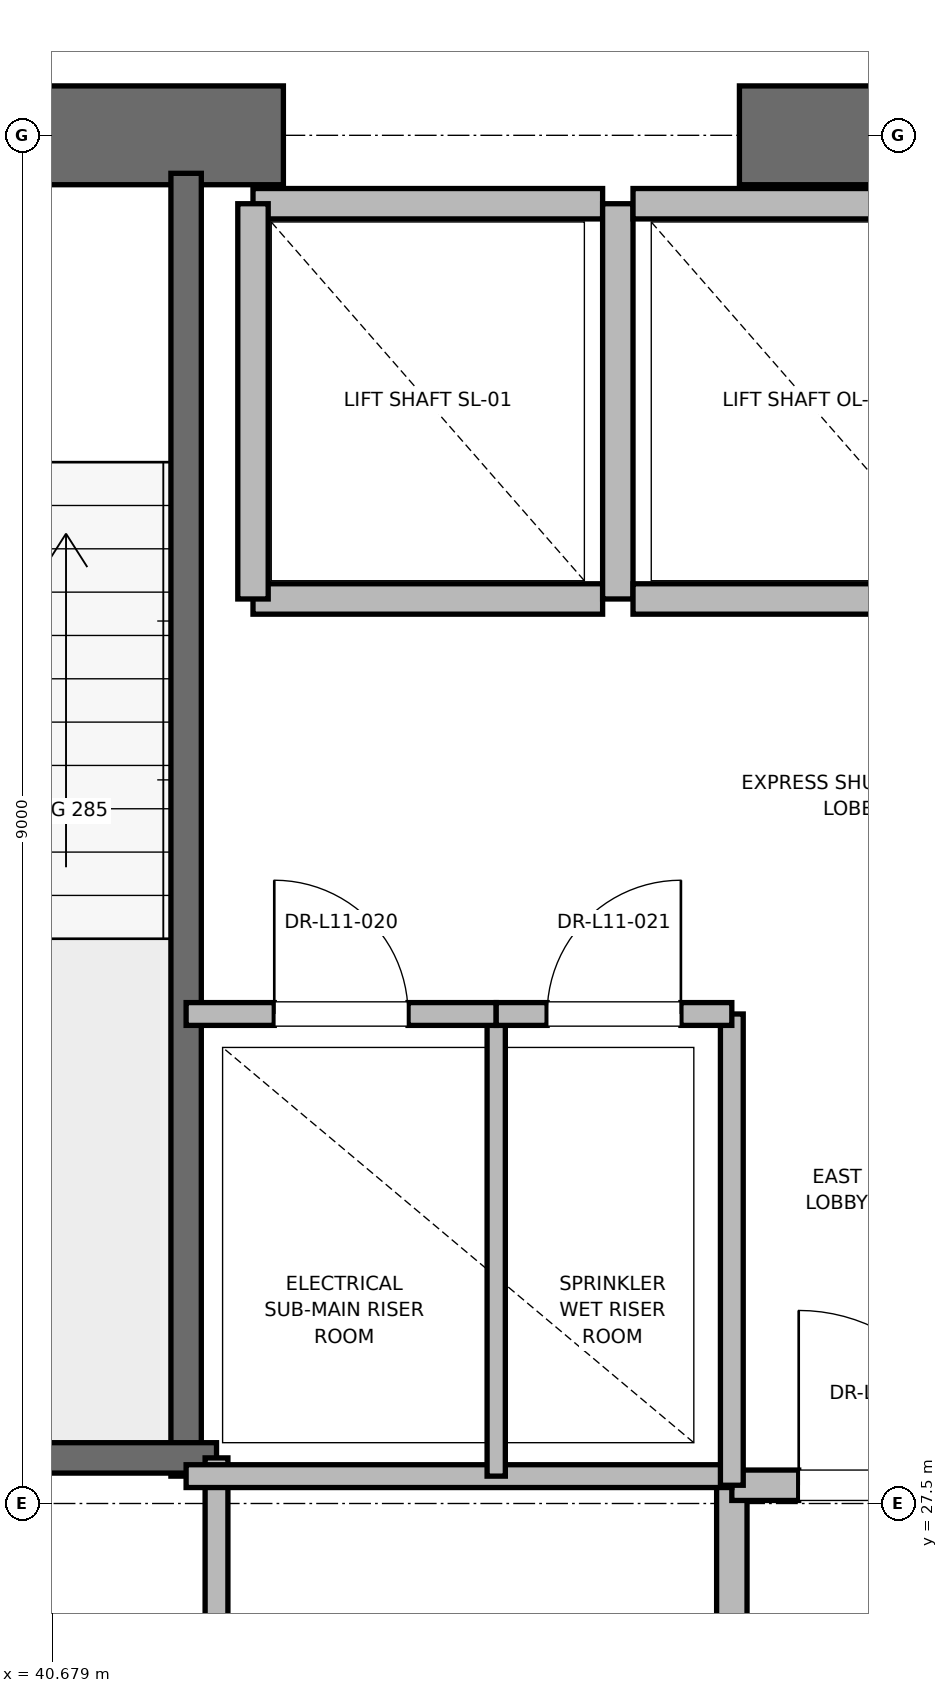
"""IFC4 building model, lengths in metres.
Left out: names, types, materials, properties, quantities, classifications, styles, units other than length and angle.
Written with IfcOpenShell. Run it as: python <this file> out.ifc"""

import sys

from ifc_helpers import new_model, si_unit, direction, frame, frame_2d, origin, place, context, subcontext, project, spatial, rectangle, extrude, element, fill, save


model = new_model("IFC4")
c1 = context("Model", 3, precision=1e-05, world=origin(), true_north=direction((0.0, 1.0)))
c2 = subcontext(c1, "Body", "Model", "MODEL_VIEW")
j1 = project(units=[si_unit("LENGTHUNIT", "METRE"), si_unit("PLANEANGLEUNIT", "RADIAN")], contexts=[c1])
p1 = place(None, origin())
s1 = spatial("IfcSite", under=j1, at=p1, CompositionType="ELEMENT")
p2 = place(p1, origin())
s2 = spatial("IfcBuilding", under=s1, at=p2, CompositionType="ELEMENT")
p3 = place(p2, frame((0.0, 0.0, 51.6)))
s3 = spatial("IfcBuildingStorey", under=s2, at=p3, CompositionType="ELEMENT", Elevation=51.6)
p4 = place(p3, frame((37.8, 36.5, 0.0), z_axis=(0.0, 0.0, 1.0), x_axis=(1.0, 0.0, 0.0)))
e1 = element("IfcWall", 1, at=p4, inside=s3, PredefinedType="SHEAR", context=c2, shape_type="SweptSolid", body=[
    extrude(rectangle(XDim=4.4, YDim=0.65, at=frame_2d((2.2, 0.0))), origin(), (0.0, 0.0, 1.0), 3.76),
])
p5 = place(p4, frame((1.65, 0.0, 0.0)))
e2 = element("IfcOpeningElement", 2, at=p5, cuts=e1, PredefinedType="OPENING", context=c2, shape_type="SweptSolid", body=[
    extrude(rectangle(XDim=1.1, YDim=2.15, at=frame_2d((0.55, 1.075))), frame((0.0, 0.325, 0.0), z_axis=(0.0, -1.0, 0.0), x_axis=(1.0, 0.0, 0.0)), (0.0, 0.0, 1.0), 0.65),
])
p6 = place(p3, frame((45.2, 36.5, 0.0), z_axis=(0.0, 0.0, 1.0), x_axis=(1.0, 0.0, 0.0)))
e3 = element("IfcWall", 3, at=p6, inside=s3, PredefinedType="SHEAR", context=c2, shape_type="SweptSolid", body=[
    extrude(rectangle(XDim=5.8, YDim=0.65, at=frame_2d((2.9, 0.0))), origin(), (0.0, 0.0, 1.0), 3.76),
])
p7 = place(p3, frame((41.56, 27.68, 0.0), z_axis=(0.0, 0.0, 1.0), x_axis=(0.0, 1.0, 0.0)))
e4 = element("IfcWall", 4, at=p7, inside=s3, PredefinedType="SOLIDWALL", context=c2, shape_type="SweptSolid", body=[
    extrude(rectangle(XDim=8.57, YDim=0.2, at=frame_2d((4.285, 0.0))), origin(), (0.0, 0.0, 1.0), 3.76),
])
p8 = place(p3, frame((38.44, 27.8, 0.0), z_axis=(0.0, 0.0, 1.0), x_axis=(1.0, 0.0, 0.0)))
e5 = element("IfcWall", 5, at=p8, inside=s3, PredefinedType="SOLIDWALL", context=c2, shape_type="SweptSolid", body=[
    extrude(rectangle(XDim=3.32, YDim=0.2, at=frame_2d((1.66, 0.0))), origin(), (0.0, 0.0, 1.0), 3.76),
])
p9 = place(p3, frame((45.15, 24.25, 0.0), z_axis=(0.0, 0.0, 1.0), x_axis=(0.0, 1.0, 0.0)))
e6 = element("IfcWall", 6, at=p9, inside=s3, PredefinedType="PARTITIONING", context=c2, shape_type="SweptSolid", body=[
    extrude(rectangle(XDim=3.37, YDim=0.2, at=frame_2d((1.685, 0.0))), origin(), (0.0, 0.0, 1.0), 3.76),
])
p10 = place(p3, frame((45.15, 27.62, 0.0), z_axis=(0.0, 0.0, 1.0), x_axis=(1.0, 0.0, 0.0)))
e7 = element("IfcWall", 7, at=p10, inside=s3, PredefinedType="PARTITIONING", context=c2, shape_type="SweptSolid", body=[
    extrude(rectangle(XDim=2.03, YDim=0.2, at=frame_2d((1.015, 0.0))), origin(), (0.0, 0.0, 1.0), 3.76),
])
p11 = place(p10, frame((0.44, 0.0, 0.0)))
e8 = element("IfcOpeningElement", 8, at=p11, cuts=e7, PredefinedType="OPENING", context=c2, shape_type="SweptSolid", body=[
    extrude(rectangle(XDim=1.15, YDim=2.2, at=frame_2d((0.575, 1.1))), frame((0.0, 0.1, 0.0), z_axis=(0.0, -1.0, 0.0), x_axis=(1.0, 0.0, 0.0)), (0.0, 0.0, 1.0), 0.2),
])
p12 = place(p3, frame((42.0, 33.45, 0.0), z_axis=(0.0, 0.0, 1.0), x_axis=(1.0, 0.0, 0.0)))
e9 = element("IfcWall", 9, at=p12, inside=s3, PredefinedType="SOLIDWALL", context=c2, shape_type="SweptSolid", body=[
    extrude(rectangle(XDim=2.3, YDim=0.2, at=frame_2d((1.15, 0.0))), origin(), (0.0, 0.0, 1.0), 3.76),
])
p13 = place(p3, frame((44.3, 36.05, 0.0), z_axis=(0.0, 0.0, 1.0), x_axis=(-1.0, 0.0, 0.0)))
e10 = element("IfcWall", 10, at=p13, inside=s3, PredefinedType="SOLIDWALL", context=c2, shape_type="SweptSolid", body=[
    extrude(rectangle(XDim=2.3, YDim=0.2, at=frame_2d((1.15, 0.0))), origin(), (0.0, 0.0, 1.0), 2.54),
])
for number, where, z_axis, x_axis in (
    (11, (42.0, 36.05, 0.0), (0.0, 0.0, 1.0), (0.0, -1.0, 0.0)),
    (12, (44.4, 33.45, 0.0), (0.0, 0.0, 1.0), (0.0, 1.0, 0.0)),
):
    element("IfcWall", number, at=place(p3, frame(where, z_axis=z_axis, x_axis=x_axis)), inside=s3, PredefinedType="SOLIDWALL", context=c2, shape_type="SweptSolid", body=[
        extrude(rectangle(XDim=2.6, YDim=0.2, at=frame_2d((1.3, 0.0))), origin(), (0.0, 0.0, 1.0), 2.54),
    ])
p14 = place(p3, frame((44.5, 33.45, 0.0), z_axis=(0.0, 0.0, 1.0), x_axis=(1.0, 0.0, 0.0)))
e13 = element("IfcWall", 13, at=p14, inside=s3, PredefinedType="SOLIDWALL", context=c2, shape_type="SweptSolid", body=[
    extrude(rectangle(XDim=2.3, YDim=0.2, at=frame_2d((1.15, 0.0))), origin(), (0.0, 0.0, 1.0), 3.76),
])
p15 = place(p3, frame((46.8, 36.05, 0.0), z_axis=(0.0, 0.0, 1.0), x_axis=(-1.0, 0.0, 0.0)))
e14 = element("IfcWall", 14, at=p15, inside=s3, PredefinedType="SOLIDWALL", context=c2, shape_type="SweptSolid", body=[
    extrude(rectangle(XDim=2.3, YDim=0.2, at=frame_2d((1.15, 0.0))), origin(), (0.0, 0.0, 1.0), 2.54),
])
p16 = place(p3, frame((41.76, 23.8, 0.0), z_axis=(0.0, 0.0, 1.0), x_axis=(0.0, 1.0, 0.0)))
e15 = element("IfcWall", 15, at=p16, inside=s3, PredefinedType="PARTITIONING", context=c2, shape_type="SweptSolid", body=[
    extrude(rectangle(XDim=4.0, YDim=0.15, at=frame_2d((2.0, 0.0))), origin(), (0.0, 0.0, 1.0), 2.85),
])
p17 = place(p3, frame((41.56, 27.68, 0.0), z_axis=(0.0, 0.0, 1.0), x_axis=(1.0, 0.0, 0.0)))
e16 = element("IfcWall", 16, at=p17, inside=s3, PredefinedType="PARTITIONING", context=c2, shape_type="SweptSolid", body=[
    extrude(rectangle(XDim=3.59, YDim=0.15, at=frame_2d((1.795, 0.0))), origin(), (0.0, 0.0, 1.0), 2.85),
])
p18 = place(p3, frame((45.15, 27.62, 0.0), z_axis=(0.0, 0.0, 1.0), x_axis=(0.0, 1.0, 0.0)))
e17 = element("IfcWall", 17, at=p18, inside=s3, PredefinedType="PARTITIONING", context=c2, shape_type="SweptSolid", body=[
    extrude(rectangle(XDim=3.1, YDim=0.15, at=frame_2d((1.55, 0.0))), origin(), (0.0, 0.0, 1.0), 2.85),
])
p19 = place(p3, frame((43.6, 27.68, 0.0), z_axis=(0.0, 0.0, 1.0), x_axis=(0.0, 1.0, 0.0)))
e18 = element("IfcWall", 18, at=p19, inside=s3, PredefinedType="PARTITIONING", context=c2, shape_type="SweptSolid", body=[
    extrude(rectangle(XDim=3.04, YDim=0.12, at=frame_2d((1.52, 0.0))), origin(), (0.0, 0.0, 1.0), 2.85),
])
p20 = place(p3, frame((41.56, 30.72, 0.0), z_axis=(0.0, 0.0, 1.0), x_axis=(1.0, 0.0, 0.0)))
e19 = element("IfcWall", 19, at=p20, inside=s3, PredefinedType="PARTITIONING", context=c2, shape_type="SweptSolid", body=[
    extrude(rectangle(XDim=2.04, YDim=0.15, at=frame_2d((1.02, 0.0))), origin(), (0.0, 0.0, 1.0), 2.85),
])
p21 = place(p20, frame((0.58, 0.0, 0.0)))
e20 = element("IfcOpeningElement", 20, at=p21, cuts=e19, PredefinedType="OPENING", context=c2, shape_type="SweptSolid", body=[
    extrude(rectangle(XDim=0.88, YDim=2.1, at=frame_2d((0.44, 1.05))), frame((0.0, 0.075, 0.0), z_axis=(0.0, -1.0, 0.0), x_axis=(1.0, 0.0, 0.0)), (0.0, 0.0, 1.0), 0.15),
])
p22 = place(p3, frame((43.6, 30.72, 0.0), z_axis=(0.0, 0.0, 1.0), x_axis=(1.0, 0.0, 0.0)))
e21 = element("IfcWall", 21, at=p22, inside=s3, PredefinedType="PARTITIONING", context=c2, shape_type="SweptSolid", body=[
    extrude(rectangle(XDim=1.55, YDim=0.15, at=frame_2d((0.775, 0.0))), origin(), (0.0, 0.0, 1.0), 2.85),
])
p23 = place(p22, frame((0.335, 0.0, 0.0)))
e22 = element("IfcOpeningElement", 22, at=p23, cuts=e21, PredefinedType="OPENING", context=c2, shape_type="SweptSolid", body=[
    extrude(rectangle(XDim=0.88, YDim=2.1, at=frame_2d((0.44, 1.05))), frame((0.0, 0.075, 0.0), z_axis=(0.0, -1.0, 0.0), x_axis=(1.0, 0.0, 0.0)), (0.0, 0.0, 1.0), 0.15),
])
p24 = place(p11, origin())
e23 = element("IfcDoor", 23, at=p24, inside=s3, OperationType="SINGLE_SWING_LEFT", PredefinedType="DOOR", context=c2, shape_type="SweptSolid", body=[
    extrude(rectangle(XDim=1.15, YDim=2.2, at=frame_2d((0.575, 1.1))), frame((0.0, 0.025, 0.0), z_axis=(0.0, -1.0, 0.0), x_axis=(1.0, 0.0, 0.0)), (0.0, 0.0, 1.0), 0.05),
])
fill(e8, e23)
p25 = place(p21, origin())
e24 = element("IfcDoor", 24, at=p25, inside=s3, OperationType="SINGLE_SWING_LEFT", PredefinedType="DOOR", context=c2, shape_type="SweptSolid", body=[
    extrude(rectangle(XDim=0.88, YDim=2.1, at=frame_2d((0.44, 1.05))), frame((0.0, 0.025, 0.0), z_axis=(0.0, -1.0, 0.0), x_axis=(1.0, 0.0, 0.0)), (0.0, 0.0, 1.0), 0.05),
])
fill(e20, e24)
p26 = place(p23, origin())
e25 = element("IfcDoor", 25, at=p26, inside=s3, OperationType="SINGLE_SWING_RIGHT", PredefinedType="DOOR", context=c2, shape_type="SweptSolid", body=[
    extrude(rectangle(XDim=0.88, YDim=2.1, at=frame_2d((0.44, 1.05))), frame((0.0, 0.025, 0.0), z_axis=(0.0, -1.0, 0.0), x_axis=(1.0, 0.0, 0.0)), (0.0, 0.0, 1.0), 0.05),
])
fill(e22, e25)
save(model, sys.argv[1])
